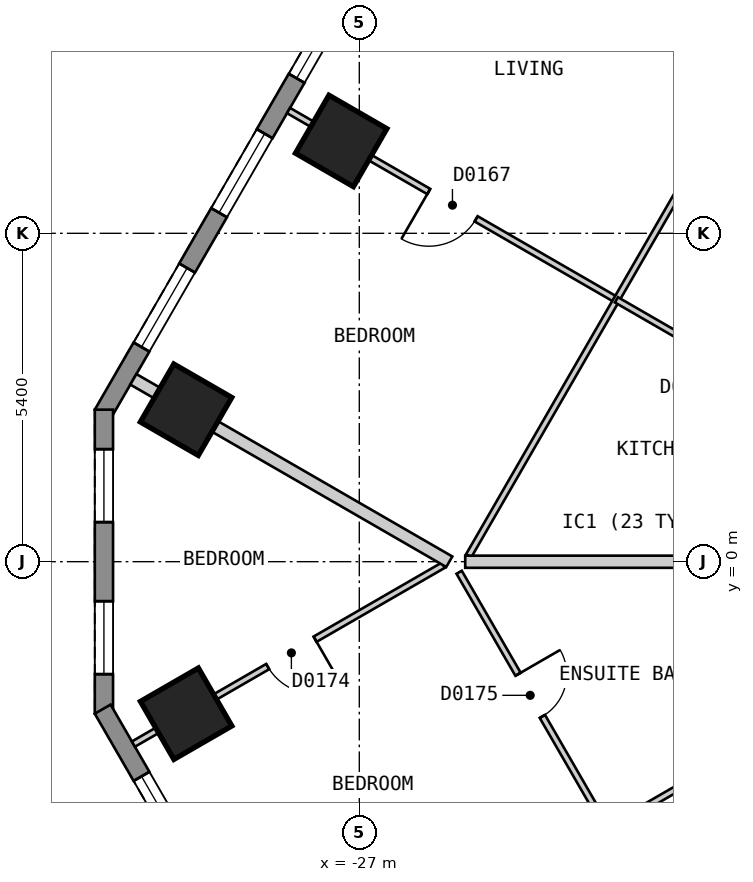
"""IFC4 building model, lengths in metres.
Left out: names, types, materials, properties, quantities, classifications, styles, units other than length and angle.
Written with IfcOpenShell. Run it as: python <this file> out.ifc"""

import sys

from ifc_helpers import new_model, si_unit, direction, frame, frame_2d, origin, origin_2d, place, context, subcontext, project, spatial, polyline, rectangle, outline, extrude, element, fill, save


model = new_model("IFC4")
c1 = context("Model", 3, precision=1e-05, world=origin(), true_north=direction((0.0, 1.0)))
c2 = subcontext(c1, "Body", "Model", "MODEL_VIEW")
j1 = project(units=[si_unit("LENGTHUNIT", "METRE"), si_unit("PLANEANGLEUNIT", "RADIAN")], contexts=[c1])
p1 = place(None, origin())
s1 = spatial("IfcSite", under=j1, at=p1, CompositionType="ELEMENT")
p2 = place(p1, origin())
s2 = spatial("IfcBuilding", under=s1, at=p2, CompositionType="ELEMENT")
p3 = place(p2, frame((0.0, 0.0, 29.4)))
s3 = spatial("IfcBuildingStorey", under=s2, at=p3, CompositionType="ELEMENT", Elevation=29.4)
for number, where, z_axis, x_axis in (
    (1, (-27.298, 6.919, 0.0), (0.0, 0.0, 1.0), (-0.5, -0.866, 0.0)),
    (2, (-29.849, 2.499, 0.0), (0.0, 0.0, 1.0), (-0.5, -0.866, 0.0)),
    (3, (-29.848, -2.5, 0.0), (0.0, 0.0, 1.0), (0.5, -0.866, 0.0)),
):
    element("IfcColumn", number, at=place(p3, frame(where, z_axis=z_axis, x_axis=x_axis)), inside=s3, PredefinedType="COLUMN", context=c2, shape_type="SweptSolid", body=[
        extrude(rectangle(XDim=1.1, YDim=1.1, at=origin_2d()), origin(), (0.0, 0.0, 1.0), 3.0),
    ])
p4 = place(p3, frame((-17.71, 25.825, 0.0), z_axis=(0.0, 0.0, 1.0), x_axis=(-0.500001938803, -0.866024284413, 0.0)))
e4 = element("IfcWall", 4, at=p4, inside=s3, PredefinedType="SOLIDWALL", context=c2, shape_type="SweptSolid", body=[
    extrude(outline(polyline([(0.0, -0.15), (27.02, -0.15), (26.94, 0.15), (0.08, 0.15), (0.0, -0.15)])), origin(), (0.0, 0.0, 1.0), 2.7),
])
p5 = place(p4, frame((1.277, 0.0, 0.15)))
e5 = element("IfcOpeningElement", 5, at=p5, cuts=e4, PredefinedType="OPENING", context=c2, shape_type="SweptSolid", body=[
    extrude(rectangle(XDim=1.5, YDim=2.1, at=frame_2d((0.75, 1.05))), frame((0.0, 0.16, 0.0), z_axis=(0.0, -1.0, 0.0), x_axis=(1.0, 0.0, 0.0)), (0.0, 0.0, 1.0), 0.32),
])
p6 = place(p4, frame((3.829, 0.0, 0.15)))
e6 = element("IfcOpeningElement", 6, at=p6, cuts=e4, PredefinedType="OPENING", context=c2, shape_type="SweptSolid", body=[
    extrude(rectangle(XDim=1.5, YDim=2.1, at=frame_2d((0.75, 1.05))), frame((0.0, 0.16, 0.0), z_axis=(0.0, -1.0, 0.0), x_axis=(1.0, 0.0, 0.0)), (0.0, 0.0, 1.0), 0.32),
])
p7 = place(p4, frame((6.382, 0.0, 0.15)))
e7 = element("IfcOpeningElement", 7, at=p7, cuts=e4, PredefinedType="OPENING", context=c2, shape_type="SweptSolid", body=[
    extrude(rectangle(XDim=1.5, YDim=2.1, at=frame_2d((0.75, 1.05))), frame((0.0, 0.16, 0.0), z_axis=(0.0, -1.0, 0.0), x_axis=(1.0, 0.0, 0.0)), (0.0, 0.0, 1.0), 0.32),
])
p8 = place(p4, frame((8.933, 0.0, 0.15)))
e8 = element("IfcOpeningElement", 8, at=p8, cuts=e4, PredefinedType="OPENING", context=c2, shape_type="SweptSolid", body=[
    extrude(rectangle(XDim=1.5, YDim=2.1, at=frame_2d((0.75, 1.05))), frame((0.0, 0.16, 0.0), z_axis=(0.0, -1.0, 0.0), x_axis=(1.0, 0.0, 0.0)), (0.0, 0.0, 1.0), 0.32),
])
p9 = place(p4, frame((11.485, 0.0, 0.15)))
e9 = element("IfcOpeningElement", 9, at=p9, cuts=e4, PredefinedType="OPENING", context=c2, shape_type="SweptSolid", body=[
    extrude(rectangle(XDim=1.5, YDim=2.1, at=frame_2d((0.75, 1.05))), frame((0.0, 0.16, 0.0), z_axis=(0.0, -1.0, 0.0), x_axis=(1.0, 0.0, 0.0)), (0.0, 0.0, 1.0), 0.32),
])
p10 = place(p4, frame((14.037, 0.0, 0.15)))
e10 = element("IfcOpeningElement", 10, at=p10, cuts=e4, PredefinedType="OPENING", context=c2, shape_type="SweptSolid", body=[
    extrude(rectangle(XDim=1.5, YDim=2.1, at=frame_2d((0.75, 1.05))), frame((0.0, 0.16, 0.0), z_axis=(0.0, -1.0, 0.0), x_axis=(1.0, 0.0, 0.0)), (0.0, 0.0, 1.0), 0.32),
])
p11 = place(p4, frame((16.589, 0.0, 0.15)))
e11 = element("IfcOpeningElement", 11, at=p11, cuts=e4, PredefinedType="OPENING", context=c2, shape_type="SweptSolid", body=[
    extrude(rectangle(XDim=1.5, YDim=2.1, at=frame_2d((0.75, 1.05))), frame((0.0, 0.16, 0.0), z_axis=(0.0, -1.0, 0.0), x_axis=(1.0, 0.0, 0.0)), (0.0, 0.0, 1.0), 0.32),
])
p12 = place(p4, frame((19.141, 0.0, 0.15)))
e12 = element("IfcOpeningElement", 12, at=p12, cuts=e4, PredefinedType="OPENING", context=c2, shape_type="SweptSolid", body=[
    extrude(rectangle(XDim=1.5, YDim=2.1, at=frame_2d((0.75, 1.05))), frame((0.0, 0.16, 0.0), z_axis=(0.0, -1.0, 0.0), x_axis=(1.0, 0.0, 0.0)), (0.0, 0.0, 1.0), 0.32),
])
p13 = place(p4, frame((21.693, 0.0, 0.15)))
e13 = element("IfcOpeningElement", 13, at=p13, cuts=e4, PredefinedType="OPENING", context=c2, shape_type="SweptSolid", body=[
    extrude(rectangle(XDim=1.5, YDim=2.1, at=frame_2d((0.75, 1.05))), frame((0.0, 0.16, 0.0), z_axis=(0.0, -1.0, 0.0), x_axis=(1.0, 0.0, 0.0)), (0.0, 0.0, 1.0), 0.32),
])
p14 = place(p4, frame((24.244, 0.0, 0.15)))
e14 = element("IfcOpeningElement", 14, at=p14, cuts=e4, PredefinedType="OPENING", context=c2, shape_type="SweptSolid", body=[
    extrude(rectangle(XDim=1.5, YDim=2.1, at=frame_2d((0.75, 1.05))), frame((0.0, 0.16, 0.0), z_axis=(0.0, -1.0, 0.0), x_axis=(1.0, 0.0, 0.0)), (0.0, 0.0, 1.0), 0.32),
])
p15 = place(p3, frame((-31.2, 2.5, 0.0), z_axis=(0.0, 0.0, 1.0), x_axis=(0.0, -1.0, 0.0)))
e15 = element("IfcWall", 15, at=p15, inside=s3, PredefinedType="SOLIDWALL", context=c2, shape_type="SweptSolid", body=[
    extrude(outline(polyline([(0.0, -0.15), (5.0, -0.15), (4.92, 0.15), (0.08, 0.15), (0.0, -0.15)])), origin(), (0.0, 0.0, 1.0), 2.7),
])
p16 = place(p15, frame((0.65, 0.0, 0.15)))
e16 = element("IfcOpeningElement", 16, at=p16, cuts=e15, PredefinedType="OPENING", context=c2, shape_type="SweptSolid", body=[
    extrude(rectangle(XDim=1.2, YDim=2.1, at=frame_2d((0.6, 1.05))), frame((0.0, 0.16, 0.0), z_axis=(0.0, -1.0, 0.0), x_axis=(1.0, 0.0, 0.0)), (0.0, 0.0, 1.0), 0.32),
])
p17 = place(p15, frame((3.15, 0.0, 0.15)))
e17 = element("IfcOpeningElement", 17, at=p17, cuts=e15, PredefinedType="OPENING", context=c2, shape_type="SweptSolid", body=[
    extrude(rectangle(XDim=1.2, YDim=2.1, at=frame_2d((0.6, 1.05))), frame((0.0, 0.16, 0.0), z_axis=(0.0, -1.0, 0.0), x_axis=(1.0, 0.0, 0.0)), (0.0, 0.0, 1.0), 0.32),
])
p18 = place(p3, frame((-31.22, -2.425, 0.0), z_axis=(0.0, 0.0, 1.0), x_axis=(0.500001938803, -0.866024284413, 0.0)))
e18 = element("IfcWall", 18, at=p18, inside=s3, PredefinedType="SOLIDWALL", context=c2, shape_type="SweptSolid", body=[
    extrude(outline(polyline([(0.0, -0.15), (27.02, -0.15), (26.94, 0.15), (0.08, 0.15), (0.0, -0.15)])), origin(), (0.0, 0.0, 1.0), 2.7),
])
p19 = place(p18, frame((1.277, 0.0, 0.15)))
e19 = element("IfcOpeningElement", 19, at=p19, cuts=e18, PredefinedType="OPENING", context=c2, shape_type="SweptSolid", body=[
    extrude(rectangle(XDim=1.5, YDim=2.1, at=frame_2d((0.75, 1.05))), frame((0.0, 0.16, 0.0), z_axis=(0.0, -1.0, 0.0), x_axis=(1.0, 0.0, 0.0)), (0.0, 0.0, 1.0), 0.32),
])
p20 = place(p18, frame((3.829, 0.0, 0.15)))
e20 = element("IfcOpeningElement", 20, at=p20, cuts=e18, PredefinedType="OPENING", context=c2, shape_type="SweptSolid", body=[
    extrude(rectangle(XDim=1.5, YDim=2.1, at=frame_2d((0.75, 1.05))), frame((0.0, 0.16, 0.0), z_axis=(0.0, -1.0, 0.0), x_axis=(1.0, 0.0, 0.0)), (0.0, 0.0, 1.0), 0.32),
])
p21 = place(p18, frame((6.382, 0.0, 0.15)))
e21 = element("IfcOpeningElement", 21, at=p21, cuts=e18, PredefinedType="OPENING", context=c2, shape_type="SweptSolid", body=[
    extrude(rectangle(XDim=1.5, YDim=2.1, at=frame_2d((0.75, 1.05))), frame((0.0, 0.16, 0.0), z_axis=(0.0, -1.0, 0.0), x_axis=(1.0, 0.0, 0.0)), (0.0, 0.0, 1.0), 0.32),
])
p22 = place(p18, frame((8.933, 0.0, 0.15)))
e22 = element("IfcOpeningElement", 22, at=p22, cuts=e18, PredefinedType="OPENING", context=c2, shape_type="SweptSolid", body=[
    extrude(rectangle(XDim=1.5, YDim=2.1, at=frame_2d((0.75, 1.05))), frame((0.0, 0.16, 0.0), z_axis=(0.0, -1.0, 0.0), x_axis=(1.0, 0.0, 0.0)), (0.0, 0.0, 1.0), 0.32),
])
p23 = place(p18, frame((11.485, 0.0, 0.15)))
e23 = element("IfcOpeningElement", 23, at=p23, cuts=e18, PredefinedType="OPENING", context=c2, shape_type="SweptSolid", body=[
    extrude(rectangle(XDim=1.5, YDim=2.1, at=frame_2d((0.75, 1.05))), frame((0.0, 0.16, 0.0), z_axis=(0.0, -1.0, 0.0), x_axis=(1.0, 0.0, 0.0)), (0.0, 0.0, 1.0), 0.32),
])
p24 = place(p18, frame((14.037, 0.0, 0.15)))
e24 = element("IfcOpeningElement", 24, at=p24, cuts=e18, PredefinedType="OPENING", context=c2, shape_type="SweptSolid", body=[
    extrude(rectangle(XDim=1.5, YDim=2.1, at=frame_2d((0.75, 1.05))), frame((0.0, 0.16, 0.0), z_axis=(0.0, -1.0, 0.0), x_axis=(1.0, 0.0, 0.0)), (0.0, 0.0, 1.0), 0.32),
])
p25 = place(p18, frame((16.589, 0.0, 0.15)))
e25 = element("IfcOpeningElement", 25, at=p25, cuts=e18, PredefinedType="OPENING", context=c2, shape_type="SweptSolid", body=[
    extrude(rectangle(XDim=1.5, YDim=2.1, at=frame_2d((0.75, 1.05))), frame((0.0, 0.16, 0.0), z_axis=(0.0, -1.0, 0.0), x_axis=(1.0, 0.0, 0.0)), (0.0, 0.0, 1.0), 0.32),
])
p26 = place(p18, frame((19.141, 0.0, 0.15)))
e26 = element("IfcOpeningElement", 26, at=p26, cuts=e18, PredefinedType="OPENING", context=c2, shape_type="SweptSolid", body=[
    extrude(rectangle(XDim=1.5, YDim=2.1, at=frame_2d((0.75, 1.05))), frame((0.0, 0.16, 0.0), z_axis=(0.0, -1.0, 0.0), x_axis=(1.0, 0.0, 0.0)), (0.0, 0.0, 1.0), 0.32),
])
p27 = place(p18, frame((21.693, 0.0, 0.15)))
e27 = element("IfcOpeningElement", 27, at=p27, cuts=e18, PredefinedType="OPENING", context=c2, shape_type="SweptSolid", body=[
    extrude(rectangle(XDim=1.5, YDim=2.1, at=frame_2d((0.75, 1.05))), frame((0.0, 0.16, 0.0), z_axis=(0.0, -1.0, 0.0), x_axis=(1.0, 0.0, 0.0)), (0.0, 0.0, 1.0), 0.32),
])
p28 = place(p18, frame((24.244, 0.0, 0.15)))
e28 = element("IfcOpeningElement", 28, at=p28, cuts=e18, PredefinedType="OPENING", context=c2, shape_type="SweptSolid", body=[
    extrude(rectangle(XDim=1.5, YDim=2.1, at=frame_2d((0.75, 1.05))), frame((0.0, 0.16, 0.0), z_axis=(0.0, -1.0, 0.0), x_axis=(1.0, 0.0, 0.0)), (0.0, 0.0, 1.0), 0.32),
])
p29 = place(p3, frame((-25.358, -0.174, 0.0), z_axis=(0.0, 0.0, 1.0), x_axis=(0.500093956194, -0.865971151354, 0.0)))
e29 = element("IfcWall", 29, at=p29, inside=s3, PredefinedType="PARTITIONING", context=c2, shape_type="SweptSolid", body=[
    extrude(rectangle(XDim=4.873, YDim=0.1, at=frame_2d((2.437, 0.0))), origin(), (0.0, 0.0, 1.0), 2.7),
])
p30 = place(p29, frame((1.937, 0.0, 0.0)))
e30 = element("IfcOpeningElement", 30, at=p30, cuts=e29, PredefinedType="OPENING", context=c2, shape_type="SweptSolid", body=[
    extrude(rectangle(XDim=0.8, YDim=2.1, at=frame_2d((0.4, 1.05))), frame((0.0, 0.06, 0.0), z_axis=(0.0, -1.0, 0.0), x_axis=(1.0, 0.0, 0.0)), (0.0, 0.0, 1.0), 0.12),
])
p31 = place(p3, frame((-28.164, 7.419, 0.0), z_axis=(0.0, 0.0, 1.0), x_axis=(0.86607068519, -0.499921562103, 0.0)))
e31 = element("IfcWall", 31, at=p31, inside=s3, PredefinedType="PARTITIONING", context=c2, shape_type="SweptSolid", body=[
    extrude(rectangle(XDim=6.227, YDim=0.1, at=frame_2d((3.114, 0.0))), origin(), (0.0, 0.0, 1.0), 2.7),
])
p32 = place(p31, frame((2.663, 0.0, 0.0)))
e32 = element("IfcOpeningElement", 32, at=p32, cuts=e31, PredefinedType="OPENING", context=c2, shape_type="SweptSolid", body=[
    extrude(rectangle(XDim=0.9, YDim=2.1, at=frame_2d((0.45, 1.05))), frame((0.0, 0.06, 0.0), z_axis=(0.0, -1.0, 0.0), x_axis=(1.0, 0.0, 0.0)), (0.0, 0.0, 1.0), 0.12),
])
p33 = place(p3, frame((-25.2, 0.099, 0.0), z_axis=(0.0, 0.0, 1.0), x_axis=(0.49997477318, 0.866039968006, 0.0)))
e33 = element("IfcWall", 33, at=p33, inside=s3, PredefinedType="PARTITIONING", context=c2, shape_type="SweptSolid", body=[
    extrude(rectangle(XDim=14.965, YDim=0.1, at=frame_2d((7.482, 0.0))), origin(), (0.0, 0.0, 1.0), 2.7),
])
p34 = place(p33, frame((6.96, 0.0, 0.0)))
e34 = element("IfcOpeningElement", 34, at=p34, cuts=e33, PredefinedType="OPENING", context=c2, shape_type="SweptSolid", body=[
    extrude(rectangle(XDim=0.9, YDim=2.1, at=frame_2d((0.45, 1.05))), frame((0.0, 0.06, 0.0), z_axis=(0.0, -1.0, 0.0), x_axis=(1.0, 0.0, 0.0)), (0.0, 0.0, 1.0), 0.12),
])
p35 = place(p3, frame((-28.163, -7.42, 0.0), z_axis=(0.0, 0.0, 1.0), x_axis=(0.866065245018, 0.499930986609, 0.0)))
e35 = element("IfcWall", 35, at=p35, inside=s3, PredefinedType="PARTITIONING", context=c2, shape_type="SweptSolid", body=[
    extrude(rectangle(XDim=10.0, YDim=0.1, at=frame_2d((5.0, 0.0))), origin(), (0.0, 0.0, 1.0), 2.7),
])
p36 = place(p35, frame((2.576, 0.0, 0.0)))
e36 = element("IfcOpeningElement", 36, at=p36, cuts=e35, PredefinedType="OPENING", context=c2, shape_type="SweptSolid", body=[
    extrude(rectangle(XDim=0.9, YDim=2.1, at=frame_2d((0.45, 1.05))), frame((0.0, 0.06, 0.0), z_axis=(0.0, -1.0, 0.0), x_axis=(1.0, 0.0, 0.0)), (0.0, 0.0, 1.0), 0.12),
])
p37 = place(p3, frame((-30.715, -3.0, 0.0), z_axis=(0.0, 0.0, 1.0), x_axis=(0.866054318203, 0.499949915414, 0.0)))
e37 = element("IfcWall", 37, at=p37, inside=s3, PredefinedType="PARTITIONING", context=c2, shape_type="SweptSolid", body=[
    extrude(rectangle(XDim=5.884, YDim=0.1, at=frame_2d((2.942, 0.0))), origin(), (0.0, 0.0, 1.0), 2.7),
])
p38 = place(p37, frame((2.55, 0.0, 0.0)))
e38 = element("IfcOpeningElement", 38, at=p38, cuts=e37, PredefinedType="OPENING", context=c2, shape_type="SweptSolid", body=[
    extrude(rectangle(XDim=0.9, YDim=2.1, at=frame_2d((0.45, 1.05))), frame((0.0, 0.06, 0.0), z_axis=(0.0, -1.0, 0.0), x_axis=(1.0, 0.0, 0.0)), (0.0, 0.0, 1.0), 0.12),
])
p39 = place(p3, frame((-30.716, 2.999, 0.0), z_axis=(0.0, 0.0, 1.0), x_axis=(0.866020924479, -0.500007758305, 0.0)))
e39 = element("IfcWall", 39, at=p39, inside=s3, PredefinedType="PARTITIONING", context=c2, shape_type="SweptSolid", body=[
    extrude(rectangle(XDim=6.0, YDim=0.2, at=frame_2d((3.0, 0.0))), origin(), (0.0, 0.0, 1.0), 2.7),
])
p40 = place(p3, frame((-25.258, -0.001, 0.0), z_axis=(0.0, 0.0, 1.0), x_axis=(1.0, 0.0, 0.0)))
e40 = element("IfcWall", 40, at=p40, inside=s3, PredefinedType="PARTITIONING", context=c2, shape_type="SweptSolid", body=[
    extrude(rectangle(XDim=4.474, YDim=0.2, at=frame_2d((2.237, 0.0))), origin(), (0.0, 0.0, 1.0), 2.7),
])
p41 = place(p3, frame((-22.771, 4.306, 0.0), z_axis=(0.0, 0.0, 1.0), x_axis=(0.866008894869, -0.50002859319, 0.0)))
e41 = element("IfcWall", 41, at=p41, inside=s3, PredefinedType="PARTITIONING", context=c2, shape_type="SweptSolid", body=[
    extrude(rectangle(XDim=3.774, YDim=0.1, at=frame_2d((1.887, 0.0))), origin(), (0.0, 0.0, 1.0), 2.7),
])
p42 = place(p41, frame((1.486, 0.0, 0.0)))
e42 = element("IfcOpeningElement", 42, at=p42, cuts=e41, PredefinedType="OPENING", context=c2, shape_type="SweptSolid", body=[
    extrude(rectangle(XDim=0.9, YDim=2.1, at=frame_2d((0.45, 1.05))), frame((0.0, 0.06, 0.0), z_axis=(0.0, -1.0, 0.0), x_axis=(1.0, 0.0, 0.0)), (0.0, 0.0, 1.0), 0.12),
])
p43 = place(p12, origin())
e43 = element("IfcWindow", 43, at=p43, inside=s3, PartitioningType="SINGLE_PANEL", PredefinedType="WINDOW", context=c2, shape_type="SweptSolid", body=[
    extrude(rectangle(XDim=1.5, YDim=2.1, at=frame_2d((0.75, 1.05))), frame((0.0, 0.03, 0.0), z_axis=(0.0, -1.0, 0.0), x_axis=(1.0, 0.0, 0.0)), (0.0, 0.0, 1.0), 0.06),
])
fill(e12, e43)
p44 = place(p13, origin())
e44 = element("IfcWindow", 44, at=p44, inside=s3, PartitioningType="SINGLE_PANEL", PredefinedType="WINDOW", context=c2, shape_type="SweptSolid", body=[
    extrude(rectangle(XDim=1.5, YDim=2.1, at=frame_2d((0.75, 1.05))), frame((0.0, 0.03, 0.0), z_axis=(0.0, -1.0, 0.0), x_axis=(1.0, 0.0, 0.0)), (0.0, 0.0, 1.0), 0.06),
])
fill(e13, e44)
p45 = place(p14, origin())
e45 = element("IfcWindow", 45, at=p45, inside=s3, PartitioningType="SINGLE_PANEL", PredefinedType="WINDOW", context=c2, shape_type="SweptSolid", body=[
    extrude(rectangle(XDim=1.5, YDim=2.1, at=frame_2d((0.75, 1.05))), frame((0.0, 0.03, 0.0), z_axis=(0.0, -1.0, 0.0), x_axis=(1.0, 0.0, 0.0)), (0.0, 0.0, 1.0), 0.06),
])
fill(e14, e45)
p46 = place(p16, origin())
e46 = element("IfcWindow", 46, at=p46, inside=s3, PartitioningType="SINGLE_PANEL", PredefinedType="WINDOW", context=c2, shape_type="SweptSolid", body=[
    extrude(rectangle(XDim=1.2, YDim=2.1, at=frame_2d((0.6, 1.05))), frame((0.0, 0.03, 0.0), z_axis=(0.0, -1.0, 0.0), x_axis=(1.0, 0.0, 0.0)), (0.0, 0.0, 1.0), 0.06),
])
fill(e16, e46)
p47 = place(p17, origin())
e47 = element("IfcWindow", 47, at=p47, inside=s3, PartitioningType="SINGLE_PANEL", PredefinedType="WINDOW", context=c2, shape_type="SweptSolid", body=[
    extrude(rectangle(XDim=1.2, YDim=2.1, at=frame_2d((0.6, 1.05))), frame((0.0, 0.03, 0.0), z_axis=(0.0, -1.0, 0.0), x_axis=(1.0, 0.0, 0.0)), (0.0, 0.0, 1.0), 0.06),
])
fill(e17, e47)
p48 = place(p19, origin())
e48 = element("IfcWindow", 48, at=p48, inside=s3, PartitioningType="SINGLE_PANEL", PredefinedType="WINDOW", context=c2, shape_type="SweptSolid", body=[
    extrude(rectangle(XDim=1.5, YDim=2.1, at=frame_2d((0.75, 1.05))), frame((0.0, 0.03, 0.0), z_axis=(0.0, -1.0, 0.0), x_axis=(1.0, 0.0, 0.0)), (0.0, 0.0, 1.0), 0.06),
])
fill(e19, e48)
p49 = place(p32, origin())
e49 = element("IfcDoor", 49, at=p49, inside=s3, OperationType="SINGLE_SWING_LEFT", PredefinedType="DOOR", context=c2, shape_type="SweptSolid", body=[
    extrude(rectangle(XDim=0.9, YDim=2.1, at=frame_2d((0.45, 1.05))), frame((0.0, 0.025, 0.0), z_axis=(0.0, -1.0, 0.0), x_axis=(1.0, 0.0, 0.0)), (0.0, 0.0, 1.0), 0.05),
])
fill(e32, e49)
p50 = place(p38, origin())
e50 = element("IfcDoor", 50, at=p50, inside=s3, OperationType="SINGLE_SWING_RIGHT", PredefinedType="DOOR", context=c2, shape_type="SweptSolid", body=[
    extrude(rectangle(XDim=0.9, YDim=2.1, at=frame_2d((0.45, 1.05))), frame((0.0, 0.025, 0.0), z_axis=(0.0, -1.0, 0.0), x_axis=(1.0, 0.0, 0.0)), (0.0, 0.0, 1.0), 0.05),
])
fill(e38, e50)
p51 = place(p30, origin())
e51 = element("IfcDoor", 51, at=p51, inside=s3, OperationType="SINGLE_SWING_LEFT", PredefinedType="DOOR", context=c2, shape_type="SweptSolid", body=[
    extrude(rectangle(XDim=0.8, YDim=2.1, at=frame_2d((0.4, 1.05))), frame((0.0, 0.025, 0.0), z_axis=(0.0, -1.0, 0.0), x_axis=(1.0, 0.0, 0.0)), (0.0, 0.0, 1.0), 0.05),
])
fill(e30, e51)
save(model, sys.argv[1])
